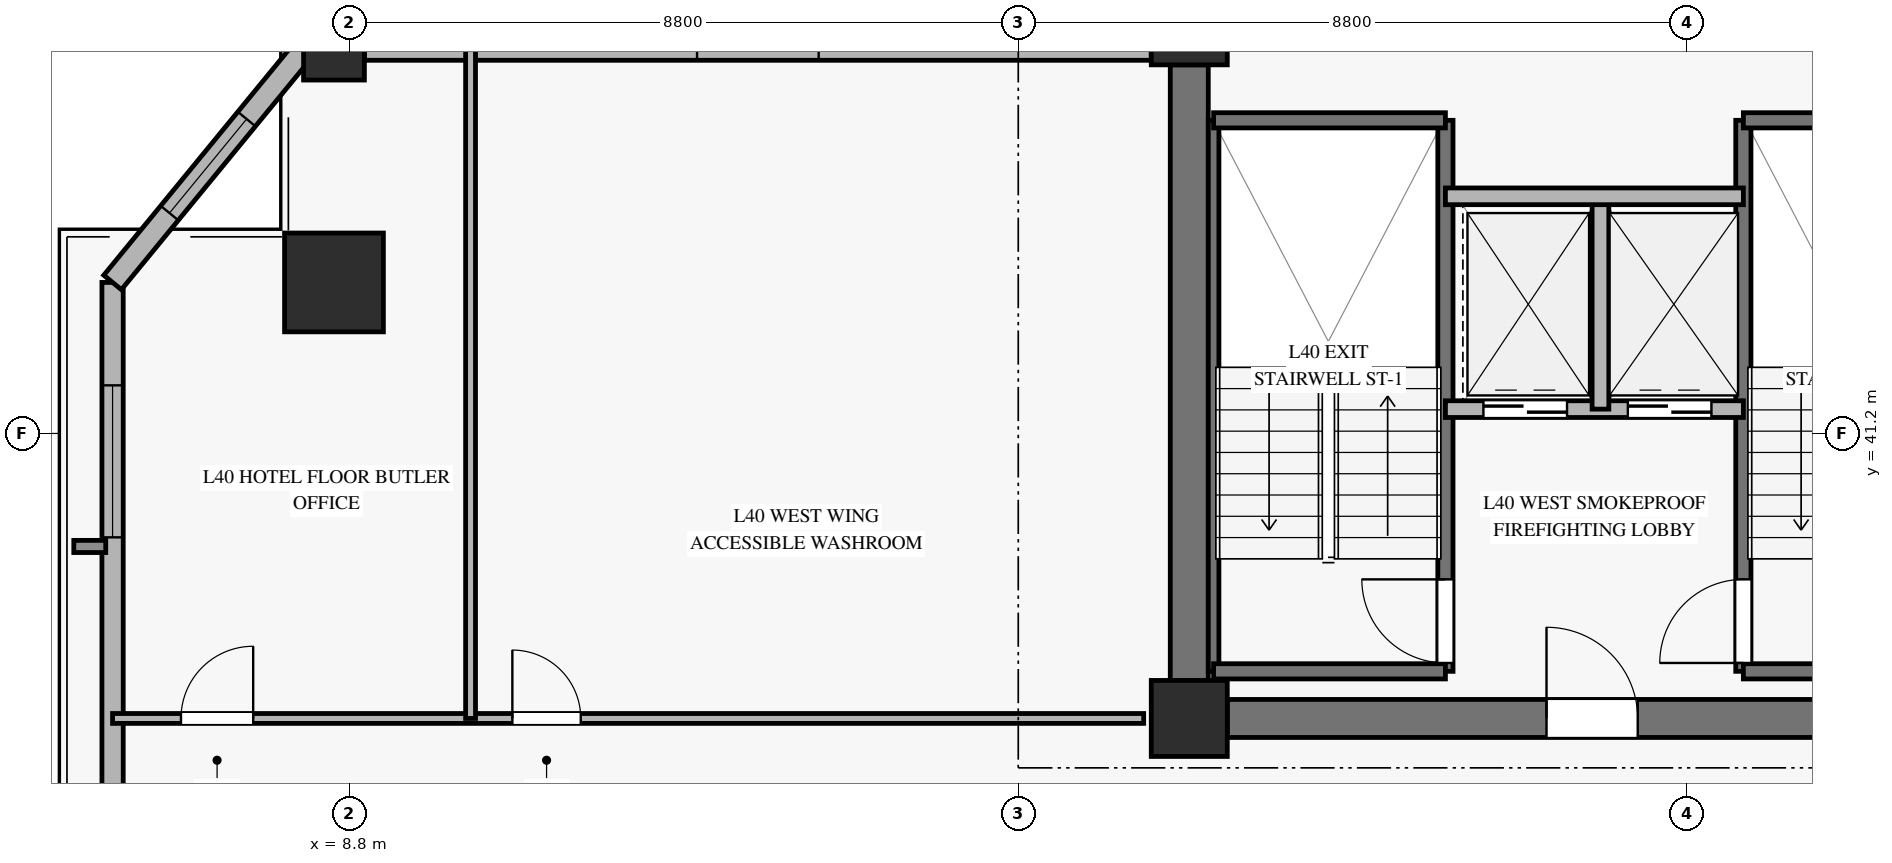
"""IFC4 building model, lengths in metres.
Left out: names, types, materials, properties, quantities, classifications, styles, units other than length and angle.
Written with IfcOpenShell. Run it as: python <this file> out.ifc"""

import sys

from ifc_helpers import new_model, si_unit, direction, frame, frame_2d, origin, origin_2d, place, context, subcontext, project, spatial, rectangle, hollow_rectangle, extrude, source, transform, mapped, element, fill, save


model = new_model("IFC4")
c1 = context("Model", 3, precision=1e-05, world=origin(), true_north=direction((0.0, 1.0)))
c2 = subcontext(c1, "Body", "Model", "MODEL_VIEW")
j1 = project(units=[si_unit("LENGTHUNIT", "METRE"), si_unit("PLANEANGLEUNIT", "RADIAN")], contexts=[c1])
p1 = place(None, origin())
s1 = spatial("IfcSite", under=j1, at=p1, CompositionType="ELEMENT")
p2 = place(p1, origin())
s2 = spatial("IfcBuilding", under=s1, at=p2, CompositionType="ELEMENT")
p3 = place(p2, frame((0.0, 0.0, 163.2)))
s3 = spatial("IfcBuildingStorey", under=s2, at=p3, CompositionType="ELEMENT", Elevation=163.2)
m1 = source(origin(), c2, "Body", "SweptSolid", [
    extrude(rectangle(XDim=1.0, YDim=1.0, at=origin_2d()), origin(), (0.0, 0.0, 1.0), 3.27),
])
for number, where, z_axis, x_axis in (
    (1, (19.85, 37.45, 0.0), (0.0, 0.0, 1.0), (1.0, 0.0, 0.0)),
    (2, (19.85, 46.55, 0.0), (0.0, 0.0, 1.0), (1.0, 0.0, 0.0)),
):
    element("IfcColumn", number, at=place(p3, frame(where, z_axis=z_axis, x_axis=x_axis)), inside=s3, PredefinedType="PILASTER", context=c2, shape_type="MappedRepresentation", body=[
        mapped(m1, transform((0.0, 0.0, 0.0), x_axis=(1.0, 0.0, 0.0), y_axis=(0.0, 1.0, 0.0), z_axis=(0.0, 0.0, 1.0), scale=1.0)),
    ])
p4 = place(p3, frame((20.35, 37.45, 0.0), z_axis=(0.0, 0.0, 1.0), x_axis=(1.0, 0.0, 0.0)))
e3 = element("IfcWall", 3, at=p4, inside=s3, PredefinedType="SHEAR", context=c2, shape_type="SweptSolid", body=[
    extrude(rectangle(XDim=9.95, YDim=0.5, at=frame_2d((4.975, 0.0))), origin(), (0.0, 0.0, 1.0), 3.27),
])
p5 = place(p4, frame((4.2, 0.0, 0.0)))
e4 = element("IfcOpeningElement", 4, at=p5, cuts=e3, PredefinedType="OPENING", context=c2, shape_type="SweptSolid", body=[
    extrude(rectangle(XDim=1.2, YDim=2.15, at=frame_2d((0.6, 1.075))), frame((0.0, 0.26, 0.0), z_axis=(0.0, -1.0, 0.0), x_axis=(1.0, 0.0, 0.0)), (0.0, 0.0, 1.0), 0.52),
])
p6 = place(p3, frame((19.85, 37.95, 0.0), z_axis=(0.0, 0.0, 1.0), x_axis=(0.0, 1.0, 0.0)))
e5 = element("IfcWall", 5, at=p6, inside=s3, PredefinedType="SHEAR", context=c2, shape_type="SweptSolid", body=[
    extrude(rectangle(XDim=8.1, YDim=0.5, at=frame_2d((4.05, 0.0))), origin(), (0.0, 0.0, 1.0), 3.27),
])
m2 = source(origin(), c2, "Body", "SweptSolid", [
    extrude(hollow_rectangle(XDim=1.3, YDim=1.3, WallThickness=0.06, at=origin_2d()), origin(), (0.0, 0.0, 1.0), 3.27),
])
p7 = place(p3, frame((8.597, 43.187, 0.0), z_axis=(0.0, 0.0, 1.0), x_axis=(1.0, 0.0, 0.0)))
e6 = element("IfcColumn", 6, at=p7, inside=s3, PredefinedType="COLUMN", context=c2, shape_type="MappedRepresentation", body=[
    mapped(m2, transform((0.0, 0.0, 0.0), x_axis=(1.0, 0.0, 0.0), y_axis=(0.0, 1.0, 0.0), z_axis=(0.0, 0.0, 1.0), scale=1.0)),
])
m3 = source(origin(), c2, "Body", "SweptSolid", [
    extrude(hollow_rectangle(XDim=0.8, YDim=0.8, WallThickness=0.036, at=origin_2d()), origin(), (0.0, 0.0, 1.0), 3.27),
])
p8 = place(p3, frame((8.597, 46.25, 0.0), z_axis=(0.0, 0.0, 1.0), x_axis=(1.0, 0.0, 0.0)))
e7 = element("IfcColumn", 7, at=p8, inside=s3, PredefinedType="COLUMN", context=c2, shape_type="MappedRepresentation", body=[
    mapped(m3, transform((0.0, 0.0, 0.0), x_axis=(1.0, 0.0, 0.0), y_axis=(0.0, 1.0, 0.0), z_axis=(0.0, 0.0, 1.0), scale=1.0)),
])
p9 = place(p3, frame((5.684, 27.999, 0.0), z_axis=(0.0, 0.0, 1.0), x_axis=(0.0, 1.0, 0.0)))
e8 = element("IfcWall", 8, at=p9, inside=s3, PredefinedType="SOLIDWALL", context=c2, shape_type="SweptSolid", body=[
    extrude(rectangle(XDim=15.188, YDim=0.28, at=frame_2d((7.594, 0.0))), origin(), (0.0, 0.0, 1.0), 2.75),
])
p10 = place(p9, frame((1.286, 0.0, 0.45)))
e9 = element("IfcOpeningElement", 9, at=p10, cuts=e8, PredefinedType="OPENING", context=c2, shape_type="SweptSolid", body=[
    extrude(rectangle(XDim=2.0, YDim=2.0, at=frame_2d((1.0, 1.0))), frame((0.0, 0.15, 0.0), z_axis=(0.0, -1.0, 0.0), x_axis=(1.0, 0.0, 0.0)), (0.0, 0.0, 1.0), 0.3),
])
p11 = place(p9, frame((11.834, 0.0, 0.45)))
e10 = element("IfcOpeningElement", 10, at=p11, cuts=e8, PredefinedType="OPENING", context=c2, shape_type="SweptSolid", body=[
    extrude(rectangle(XDim=2.0, YDim=2.0, at=frame_2d((1.0, 1.0))), frame((0.0, 0.15, 0.0), z_axis=(0.0, -1.0, 0.0), x_axis=(1.0, 0.0, 0.0)), (0.0, 0.0, 1.0), 0.3),
])
p12 = place(p3, frame((8.997, 46.25, 0.0), z_axis=(0.0, 0.0, 1.0), x_axis=(1.0, 0.0, 0.0)))
e11 = element("IfcWall", 11, at=p12, inside=s3, PredefinedType="SOLIDWALL", context=c2, shape_type="SweptSolid", body=[
    extrude(rectangle(XDim=10.353, YDim=0.28, at=frame_2d((5.177, 0.0))), origin(), (0.0, 0.0, 1.0), 2.75),
])
p13 = place(p12, frame((4.377, 0.0, 0.45)))
e12 = element("IfcOpeningElement", 12, at=p13, cuts=e11, PredefinedType="OPENING", context=c2, shape_type="SweptSolid", body=[
    extrude(rectangle(XDim=1.6, YDim=2.0, at=frame_2d((0.8, 1.0))), frame((0.0, 0.15, 0.0), z_axis=(0.0, -1.0, 0.0), x_axis=(1.0, 0.0, 0.0)), (0.0, 0.0, 1.0), 0.3),
])
p14 = place(p3, frame((8.197, 46.25, 0.0), z_axis=(0.0, 0.0, 1.0), x_axis=(-0.634274117039, -0.773108235925, 0.0)))
e13 = element("IfcWall", 13, at=p14, inside=s3, PredefinedType="SOLIDWALL", context=c2, shape_type="SweptSolid", body=[
    extrude(rectangle(XDim=3.962, YDim=0.3, at=frame_2d((1.981, 0.0))), origin(), (0.0, 0.0, 1.0), 2.75),
])
p15 = place(p14, frame((1.181, 0.0, 0.45)))
e14 = element("IfcOpeningElement", 14, at=p15, cuts=e13, PredefinedType="OPENING", context=c2, shape_type="SweptSolid", body=[
    extrude(rectangle(XDim=1.6, YDim=2.0, at=frame_2d((0.8, 1.0))), frame((0.0, 0.16, 0.0), z_axis=(0.0, -1.0, 0.0), x_axis=(1.0, 0.0, 0.0)), (0.0, 0.0, 1.0), 0.32),
])
p16 = place(p3, frame((20.17, 38.07, 0.0), z_axis=(0.0, 0.0, 1.0), x_axis=(0.0, 1.0, 0.0)))
e15 = element("IfcWall", 15, at=p16, inside=s3, PredefinedType="SOLIDWALL", context=c2, shape_type="SweptSolid", body=[
    extrude(rectangle(XDim=7.25, YDim=0.14, at=frame_2d((3.625, 0.0))), origin(), (0.0, 0.0, 1.0), 3.5),
])
p17 = place(p3, frame((23.22, 38.07, 0.0), z_axis=(0.0, 0.0, 1.0), x_axis=(0.0, 1.0, 0.0)))
e16 = element("IfcWall", 16, at=p17, inside=s3, PredefinedType="SOLIDWALL", context=c2, shape_type="SweptSolid", body=[
    extrude(rectangle(XDim=7.25, YDim=0.2, at=frame_2d((3.625, 0.0))), origin(), (0.0, 0.0, 1.0), 3.5),
])
p18 = place(p17, frame((0.11, 0.0, 0.0)))
e17 = element("IfcOpeningElement", 17, at=p18, cuts=e16, PredefinedType="OPENING", context=c2, shape_type="SweptSolid", body=[
    extrude(rectangle(XDim=1.1, YDim=2.15, at=frame_2d((0.55, 1.075))), frame((0.0, 0.11, 0.0), z_axis=(0.0, -1.0, 0.0), x_axis=(1.0, 0.0, 0.0)), (0.0, 0.0, 1.0), 0.22),
])
for number, where, z_axis, x_axis in (
    (18, (20.17, 45.32, 0.0), (0.0, 0.0, 1.0), (1.0, 0.0, 0.0)),
    (19, (20.17, 38.07, 0.0), (0.0, 0.0, 1.0), (1.0, 0.0, 0.0)),
):
    element("IfcWall", number, at=place(p3, frame(where, z_axis=z_axis, x_axis=x_axis)), inside=s3, PredefinedType="SOLIDWALL", context=c2, shape_type="SweptSolid", body=[
        extrude(rectangle(XDim=3.05, YDim=0.2, at=frame_2d((1.525, 0.0))), origin(), (0.0, 0.0, 1.0), 3.5),
    ])
p19 = place(p3, frame((27.14, 38.07, 0.0), z_axis=(0.0, 0.0, 1.0), x_axis=(0.0, 1.0, 0.0)))
e20 = element("IfcWall", 20, at=p19, inside=s3, PredefinedType="SOLIDWALL", context=c2, shape_type="SweptSolid", body=[
    extrude(rectangle(XDim=7.25, YDim=0.2, at=frame_2d((3.625, 0.0))), origin(), (0.0, 0.0, 1.0), 3.5),
])
p20 = place(p19, frame((0.11, 0.0, 0.0)))
e21 = element("IfcOpeningElement", 21, at=p20, cuts=e20, PredefinedType="OPENING", context=c2, shape_type="SweptSolid", body=[
    extrude(rectangle(XDim=1.1, YDim=2.15, at=frame_2d((0.55, 1.075))), frame((0.0, 0.11, 0.0), z_axis=(0.0, -1.0, 0.0), x_axis=(1.0, 0.0, 0.0)), (0.0, 0.0, 1.0), 0.22),
])
for number, where, z_axis, x_axis in (
    (22, (27.14, 45.32, 0.0), (0.0, 0.0, 1.0), (1.0, 0.0, 0.0)),
    (23, (27.14, 38.07, 0.0), (0.0, 0.0, 1.0), (1.0, 0.0, 0.0)),
):
    element("IfcWall", number, at=place(p3, frame(where, z_axis=z_axis, x_axis=x_axis)), inside=s3, PredefinedType="SOLIDWALL", context=c2, shape_type="SweptSolid", body=[
        extrude(rectangle(XDim=3.08, YDim=0.2, at=frame_2d((1.54, 0.0))), origin(), (0.0, 0.0, 1.0), 3.5),
    ])
p21 = place(p3, frame((23.22, 41.52, 0.0), z_axis=(0.0, 0.0, 1.0), x_axis=(1.0, 0.0, 0.0)))
e24 = element("IfcWall", 24, at=p21, inside=s3, PredefinedType="SOLIDWALL", context=c2, shape_type="SweptSolid", body=[
    extrude(rectangle(XDim=3.92, YDim=0.22, at=frame_2d((1.96, 0.0))), origin(), (0.0, 0.0, 1.0), 3.27),
])
p22 = place(p21, frame((0.5, 0.0, 0.0)))
e25 = element("IfcOpeningElement", 25, at=p22, cuts=e24, PredefinedType="OPENING", context=c2, shape_type="SweptSolid", body=[
    extrude(rectangle(XDim=1.1, YDim=2.2, at=frame_2d((0.55, 1.1))), frame((0.0, 0.12, 0.0), z_axis=(0.0, -1.0, 0.0), x_axis=(1.0, 0.0, 0.0)), (0.0, 0.0, 1.0), 0.24),
])
p23 = place(p21, frame((2.4, 0.0, 0.0)))
e26 = element("IfcOpeningElement", 26, at=p23, cuts=e24, PredefinedType="OPENING", context=c2, shape_type="SweptSolid", body=[
    extrude(rectangle(XDim=1.1, YDim=2.2, at=frame_2d((0.55, 1.1))), frame((0.0, 0.12, 0.0), z_axis=(0.0, -1.0, 0.0), x_axis=(1.0, 0.0, 0.0)), (0.0, 0.0, 1.0), 0.24),
])
p24 = place(p3, frame((25.26, 41.52, 0.0), z_axis=(0.0, 0.0, 1.0), x_axis=(0.0, 1.0, 0.0)))
e27 = element("IfcWall", 27, at=p24, inside=s3, PredefinedType="SOLIDWALL", context=c2, shape_type="SweptSolid", body=[
    extrude(rectangle(XDim=2.8, YDim=0.22, at=frame_2d((1.4, 0.0))), origin(), (0.0, 0.0, 1.0), 3.27),
])
p25 = place(p3, frame((23.22, 44.32, 0.0), z_axis=(0.0, 0.0, 1.0), x_axis=(1.0, 0.0, 0.0)))
e28 = element("IfcWall", 28, at=p25, inside=s3, PredefinedType="SOLIDWALL", context=c2, shape_type="SweptSolid", body=[
    extrude(rectangle(XDim=3.92, YDim=0.22, at=frame_2d((1.96, 0.0))), origin(), (0.0, 0.0, 1.0), 3.27),
])
p26 = place(p3, frame((5.684, 37.45, 0.0), z_axis=(0.0, 0.0, 1.0), x_axis=(1.0, 0.0, 0.0)))
e29 = element("IfcWall", 29, at=p26, inside=s3, PredefinedType="PARTITIONING", context=c2, shape_type="SweptSolid", body=[
    extrude(rectangle(XDim=13.566, YDim=0.13, at=frame_2d((6.783, 0.0))), origin(), (0.0, 0.0, 1.0), 2.755),
])
p27 = place(p26, frame((0.9, 0.0, 0.0)))
e30 = element("IfcOpeningElement", 30, at=p27, cuts=e29, PredefinedType="OPENING", context=c2, shape_type="SweptSolid", body=[
    extrude(rectangle(XDim=0.95, YDim=2.1, at=frame_2d((0.475, 1.05))), frame((0.0, 0.075, 0.0), z_axis=(0.0, -1.0, 0.0), x_axis=(1.0, 0.0, 0.0)), (0.0, 0.0, 1.0), 0.15),
])
p28 = place(p26, frame((5.26, 0.0, 0.0)))
e31 = element("IfcOpeningElement", 31, at=p28, cuts=e29, PredefinedType="OPENING", context=c2, shape_type="SweptSolid", body=[
    extrude(rectangle(XDim=0.9, YDim=2.1, at=frame_2d((0.45, 1.05))), frame((0.0, 0.075, 0.0), z_axis=(0.0, -1.0, 0.0), x_axis=(1.0, 0.0, 0.0)), (0.0, 0.0, 1.0), 0.15),
])
p29 = place(p3, frame((10.394, 37.45, 0.0), z_axis=(0.0, 0.0, 1.0), x_axis=(0.0, 1.0, 0.0)))
e32 = element("IfcWall", 32, at=p29, inside=s3, PredefinedType="PARTITIONING", context=c2, shape_type="SweptSolid", body=[
    extrude(rectangle(XDim=8.8, YDim=0.13, at=frame_2d((4.4, 0.0))), origin(), (0.0, 0.0, 1.0), 3.27),
])
m4 = source(origin(), c2, "Body", "SweptSolid", [
    extrude(rectangle(XDim=2.0, YDim=2.0, at=frame_2d((1.0, 1.0))), frame((0.0, 0.03, 0.0), z_axis=(0.0, -1.0, 0.0), x_axis=(1.0, 0.0, 0.0)), (0.0, 0.0, 1.0), 0.06),
])
p30 = place(p11, origin())
e33 = element("IfcWindow", 33, at=p30, inside=s3, PartitioningType="SINGLE_PANEL", PredefinedType="WINDOW", context=c2, shape_type="MappedRepresentation", body=[
    mapped(m4, transform((0.0, 0.0, 0.0), x_axis=(1.0, 0.0, 0.0), y_axis=(0.0, 1.0, 0.0), z_axis=(0.0, 0.0, 1.0), scale=1.0)),
])
fill(e10, e33)
m5 = source(origin(), c2, "Body", "SweptSolid", [
    extrude(rectangle(XDim=1.6, YDim=2.0, at=frame_2d((0.8, 1.0))), frame((0.0, 0.03, 0.0), z_axis=(0.0, -1.0, 0.0), x_axis=(1.0, 0.0, 0.0)), (0.0, 0.0, 1.0), 0.06),
])
p31 = place(p15, origin())
e34 = element("IfcWindow", 34, at=p31, inside=s3, PartitioningType="SINGLE_PANEL", PredefinedType="WINDOW", context=c2, shape_type="MappedRepresentation", body=[
    mapped(m5, transform((0.0, 0.0, 0.0), x_axis=(1.0, 0.0, 0.0), y_axis=(0.0, 1.0, 0.0), z_axis=(0.0, 0.0, 1.0), scale=1.0)),
])
fill(e14, e34)
m6 = source(origin(), c2, "Body", "SweptSolid", [
    extrude(rectangle(XDim=1.1, YDim=2.15, at=frame_2d((0.55, 1.075))), frame((0.0, 0.025, 0.0), z_axis=(0.0, -1.0, 0.0), x_axis=(1.0, 0.0, 0.0)), (0.0, 0.0, 1.0), 0.05),
])
p32 = place(p18, origin())
e35 = element("IfcDoor", 35, at=p32, inside=s3, OperationType="SINGLE_SWING_RIGHT", PredefinedType="DOOR", context=c2, shape_type="MappedRepresentation", body=[
    mapped(m6, transform((0.0, 0.0, 0.0), x_axis=(1.0, 0.0, 0.0), y_axis=(0.0, 1.0, 0.0), z_axis=(0.0, 0.0, 1.0), scale=1.0)),
])
fill(e17, e35)
p33 = place(p20, origin())
e36 = element("IfcDoor", 36, at=p33, inside=s3, OperationType="SINGLE_SWING_LEFT", PredefinedType="DOOR", context=c2, shape_type="MappedRepresentation", body=[
    mapped(m6, transform((0.0, 0.0, 0.0), x_axis=(1.0, 0.0, 0.0), y_axis=(0.0, 1.0, 0.0), z_axis=(0.0, 0.0, 1.0), scale=1.0)),
])
fill(e21, e36)
m7 = source(origin(), c2, "Body", "SweptSolid", [
    extrude(rectangle(XDim=1.1, YDim=2.2, at=frame_2d((0.55, 1.1))), frame((0.0, 0.025, 0.0), z_axis=(0.0, -1.0, 0.0), x_axis=(1.0, 0.0, 0.0)), (0.0, 0.0, 1.0), 0.05),
])
p34 = place(p22, origin())
e37 = element("IfcDoor", 37, at=p34, inside=s3, OperationType="SLIDING_TO_LEFT", PredefinedType="DOOR", context=c2, shape_type="MappedRepresentation", body=[
    mapped(m7, transform((0.0, 0.0, 0.0), x_axis=(1.0, 0.0, 0.0), y_axis=(0.0, 1.0, 0.0), z_axis=(0.0, 0.0, 1.0), scale=1.0)),
])
fill(e25, e37)
p35 = place(p23, origin())
e38 = element("IfcDoor", 38, at=p35, inside=s3, OperationType="SLIDING_TO_LEFT", PredefinedType="DOOR", context=c2, shape_type="MappedRepresentation", body=[
    mapped(m7, transform((0.0, 0.0, 0.0), x_axis=(1.0, 0.0, 0.0), y_axis=(0.0, 1.0, 0.0), z_axis=(0.0, 0.0, 1.0), scale=1.0)),
])
fill(e26, e38)
m8 = source(origin(), c2, "Body", "SweptSolid", [
    extrude(rectangle(XDim=1.2, YDim=2.15, at=frame_2d((0.6, 1.075))), frame((0.0, 0.025, 0.0), z_axis=(0.0, -1.0, 0.0), x_axis=(1.0, 0.0, 0.0)), (0.0, 0.0, 1.0), 0.05),
])
p36 = place(p5, origin())
e39 = element("IfcDoor", 39, at=p36, inside=s3, OperationType="SINGLE_SWING_LEFT", PredefinedType="DOOR", context=c2, shape_type="MappedRepresentation", body=[
    mapped(m8, transform((0.0, 0.0, 0.0), x_axis=(1.0, 0.0, 0.0), y_axis=(0.0, 1.0, 0.0), z_axis=(0.0, 0.0, 1.0), scale=1.0)),
])
fill(e4, e39)
m9 = source(origin(), c2, "Body", "SweptSolid", [
    extrude(rectangle(XDim=0.95, YDim=2.1, at=frame_2d((0.475, 1.05))), frame((0.0, 0.025, 0.0), z_axis=(0.0, -1.0, 0.0), x_axis=(1.0, 0.0, 0.0)), (0.0, 0.0, 1.0), 0.05),
])
p37 = place(p27, origin())
e40 = element("IfcDoor", 40, at=p37, inside=s3, OperationType="SINGLE_SWING_RIGHT", PredefinedType="DOOR", context=c2, shape_type="MappedRepresentation", body=[
    mapped(m9, transform((0.0, 0.0, 0.0), x_axis=(1.0, 0.0, 0.0), y_axis=(0.0, 1.0, 0.0), z_axis=(0.0, 0.0, 1.0), scale=1.0)),
])
fill(e30, e40)
m10 = source(origin(), c2, "Body", "SweptSolid", [
    extrude(rectangle(XDim=0.9, YDim=2.1, at=frame_2d((0.45, 1.05))), frame((0.0, 0.025, 0.0), z_axis=(0.0, -1.0, 0.0), x_axis=(1.0, 0.0, 0.0)), (0.0, 0.0, 1.0), 0.05),
])
p38 = place(p28, origin())
e41 = element("IfcDoor", 41, at=p38, inside=s3, OperationType="SINGLE_SWING_LEFT", PredefinedType="DOOR", context=c2, shape_type="MappedRepresentation", body=[
    mapped(m10, transform((0.0, 0.0, 0.0), x_axis=(1.0, 0.0, 0.0), y_axis=(0.0, 1.0, 0.0), z_axis=(0.0, 0.0, 1.0), scale=1.0)),
])
fill(e31, e41)
save(model, sys.argv[1])
